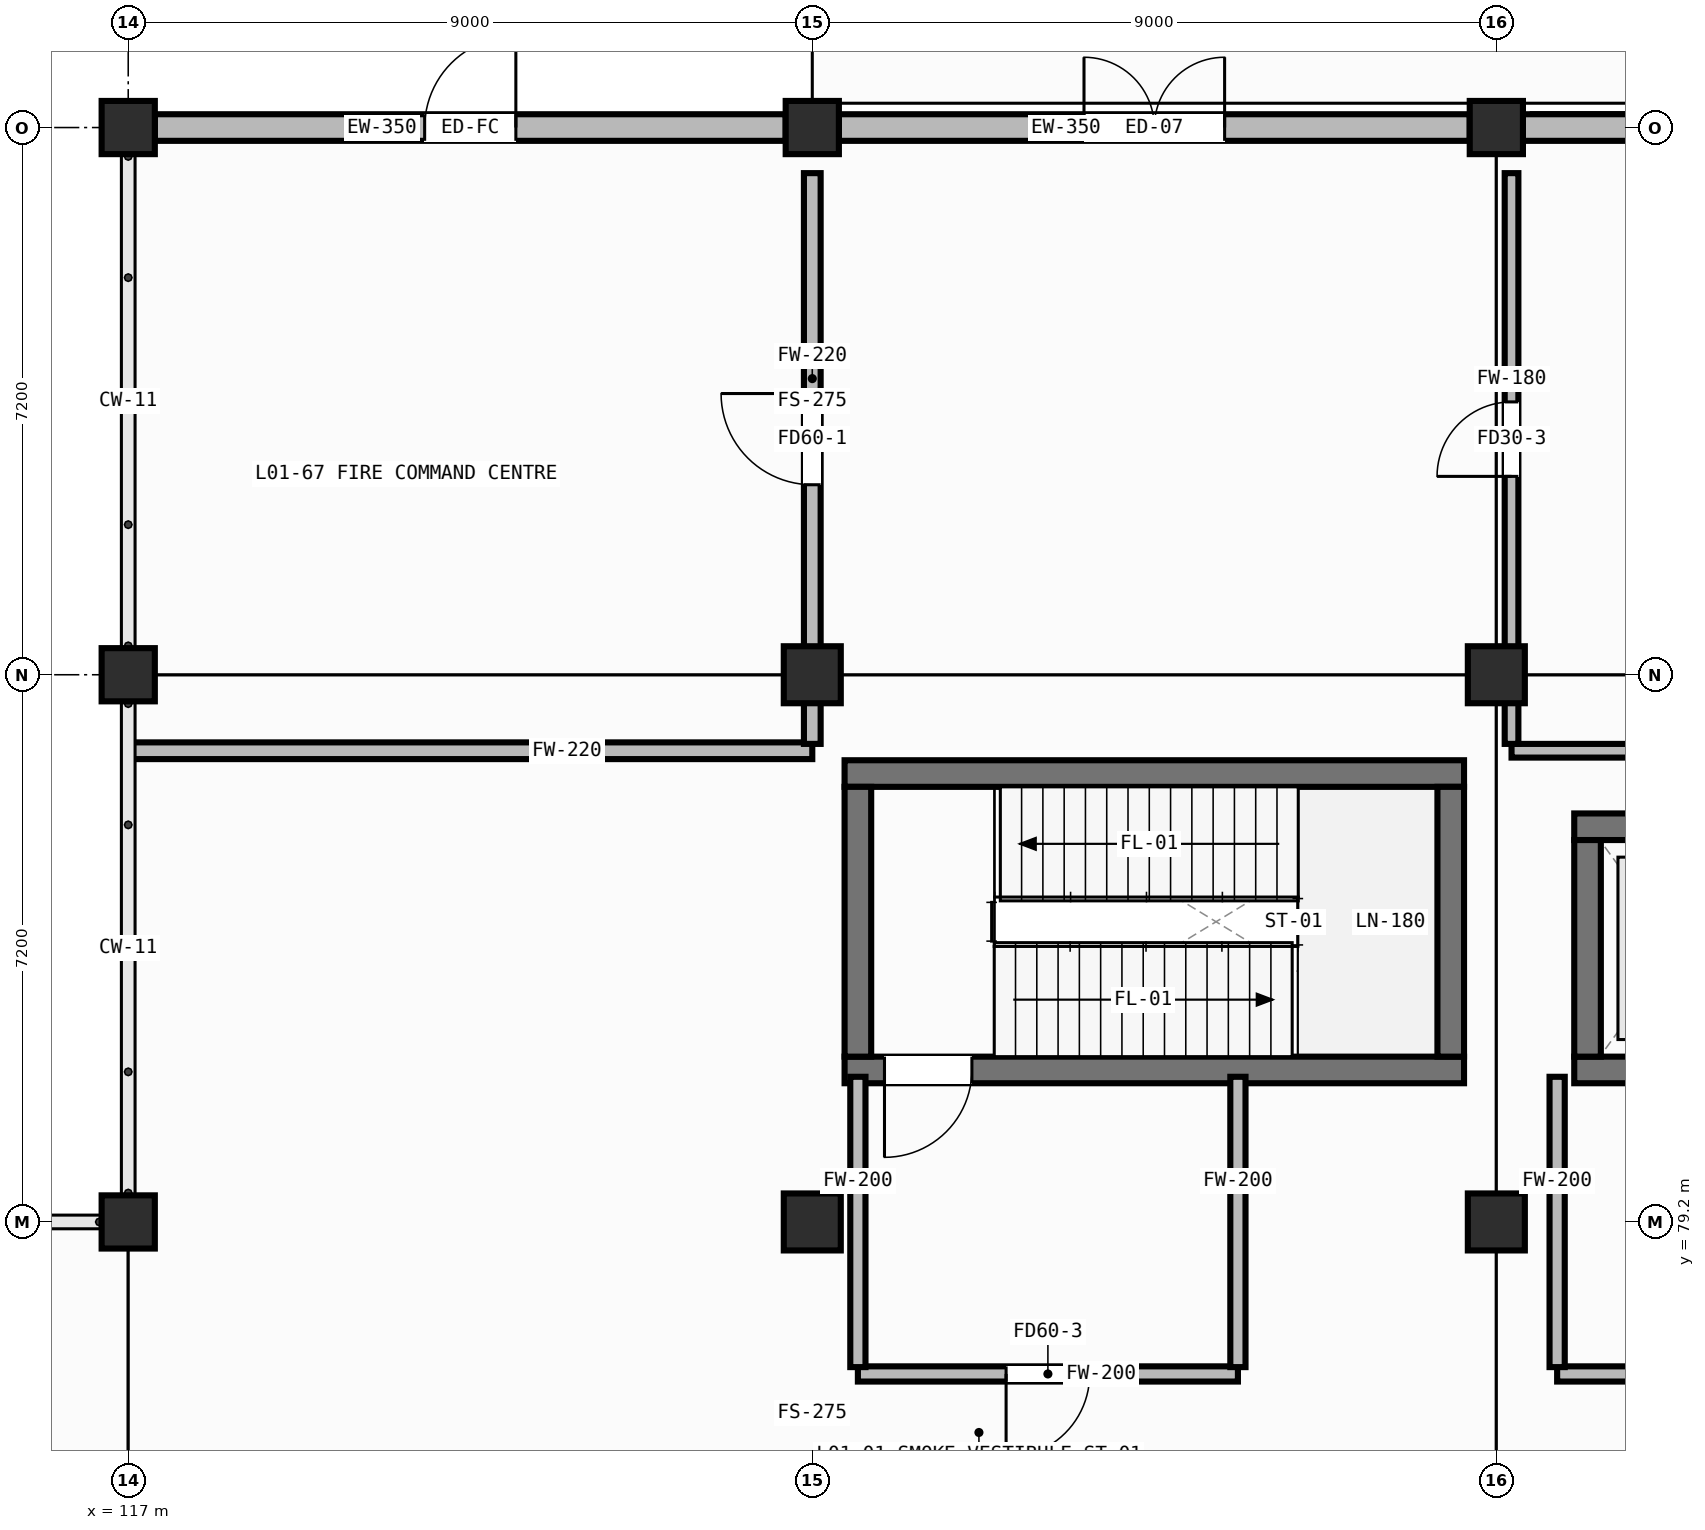
"""IFC4 building model, lengths in metres.
Left out: names, types, materials, properties, quantities, classifications, styles, units other than length and angle.
Written with IfcOpenShell. Run it as: python <this file> out.ifc"""

import sys

from ifc_helpers import new_model, si_unit, direction, frame, frame_2d, origin, origin_2d, place, context, subcontext, project, spatial, rectangle, hollow_rectangle, extrude, element, fill, save


model = new_model("IFC4")
c1 = context("Model", 3, precision=1e-05, world=origin(), true_north=direction((0.0, 1.0)))
c2 = subcontext(c1, "Body", "Model", "MODEL_VIEW")
j1 = project(units=[si_unit("LENGTHUNIT", "METRE"), si_unit("PLANEANGLEUNIT", "RADIAN")], contexts=[c1])
p1 = place(None, origin())
s1 = spatial("IfcSite", under=j1, at=p1, CompositionType="ELEMENT")
p2 = place(p1, origin())
s2 = spatial("IfcBuilding", under=s1, at=p2, CompositionType="ELEMENT")
p3 = place(p2, origin())
s3 = spatial("IfcBuildingStorey", under=s2, at=p3, CompositionType="ELEMENT", Elevation=0.0)
for number, where, z_axis, x_axis in (
    (1, (117.0, 79.2, 0.0), (0.0, 0.0, 1.0), (1.0, 0.0, 0.0)),
    (2, (117.0, 86.4, 0.0), (0.0, 0.0, 1.0), (1.0, 0.0, 0.0)),
    (3, (117.0, 93.6, 0.0), (0.0, 0.0, 1.0), (1.0, 0.0, 0.0)),
):
    element("IfcColumn", number, at=place(p3, frame(where, z_axis=z_axis, x_axis=x_axis)), inside=s3, PredefinedType="COLUMN", context=c2, shape_type="SweptSolid", body=[
        extrude(hollow_rectangle(XDim=0.7, YDim=0.7, WallThickness=0.028, at=origin_2d()), origin(), (0.0, 0.0, 1.0), 4.8),
    ])
for number, where, z_axis, x_axis in (
    (4, (126.0, 79.2, 0.0), (0.0, 0.0, 1.0), (1.0, 0.0, 0.0)),
    (5, (126.0, 86.4, 0.0), (0.0, 0.0, 1.0), (1.0, 0.0, 0.0)),
):
    element("IfcColumn", number, at=place(p3, frame(where, z_axis=z_axis, x_axis=x_axis)), inside=s3, PredefinedType="COLUMN", context=c2, shape_type="SweptSolid", body=[
        extrude(hollow_rectangle(XDim=0.75, YDim=0.75, WallThickness=0.032, at=origin_2d()), origin(), (0.0, 0.0, 1.0), 4.8),
    ])
p4 = place(p3, frame((126.0, 93.6, 0.0), z_axis=(0.0, 0.0, 1.0), x_axis=(1.0, 0.0, 0.0)))
e6 = element("IfcColumn", 6, at=p4, inside=s3, PredefinedType="COLUMN", context=c2, shape_type="SweptSolid", body=[
    extrude(hollow_rectangle(XDim=0.7, YDim=0.7, WallThickness=0.028, at=origin_2d()), origin(), (0.0, 0.0, 1.0), 4.8),
])
for number, where, z_axis, x_axis in (
    (7, (135.0, 79.2, 0.0), (0.0, 0.0, 1.0), (1.0, 0.0, 0.0)),
    (8, (135.0, 86.4, 0.0), (0.0, 0.0, 1.0), (1.0, 0.0, 0.0)),
):
    element("IfcColumn", number, at=place(p3, frame(where, z_axis=z_axis, x_axis=x_axis)), inside=s3, PredefinedType="COLUMN", context=c2, shape_type="SweptSolid", body=[
        extrude(hollow_rectangle(XDim=0.75, YDim=0.75, WallThickness=0.032, at=origin_2d()), origin(), (0.0, 0.0, 1.0), 4.8),
    ])
p5 = place(p3, frame((135.0, 93.6, 0.0), z_axis=(0.0, 0.0, 1.0), x_axis=(1.0, 0.0, 0.0)))
e9 = element("IfcColumn", 9, at=p5, inside=s3, PredefinedType="COLUMN", context=c2, shape_type="SweptSolid", body=[
    extrude(hollow_rectangle(XDim=0.7, YDim=0.7, WallThickness=0.028, at=origin_2d()), origin(), (0.0, 0.0, 1.0), 4.8),
])
p6 = place(p3, frame((125.65, 93.6, 0.0), z_axis=(0.0, 0.0, 1.0), x_axis=(-1.0, 0.0, 0.0)))
e10 = element("IfcWall", 10, at=p6, inside=s3, PredefinedType="STANDARD", context=c2, shape_type="SweptSolid", body=[
    extrude(rectangle(XDim=8.3, YDim=0.35, at=frame_2d((4.15, 0.0))), origin(), (0.0, 0.0, 1.0), 4.055),
])
p7 = place(p6, frame((3.55, 0.0, 0.0)))
e11 = element("IfcOpeningElement", 11, at=p7, cuts=e10, PredefinedType="OPENING", context=c2, shape_type="SweptSolid", body=[
    extrude(rectangle(XDim=1.2, YDim=2.2, at=frame_2d((0.6, 1.1))), frame((0.0, 0.187, 0.0), z_axis=(0.0, -1.0, 0.0), x_axis=(1.0, 0.0, 0.0)), (0.0, 0.0, 1.0), 0.374),
])
p8 = place(p3, frame((134.65, 93.6, 0.0), z_axis=(0.0, 0.0, 1.0), x_axis=(-1.0, 0.0, 0.0)))
e12 = element("IfcWall", 12, at=p8, inside=s3, PredefinedType="STANDARD", context=c2, shape_type="SweptSolid", body=[
    extrude(rectangle(XDim=8.3, YDim=0.35, at=frame_2d((4.15, 0.0))), origin(), (0.0, 0.0, 1.0), 4.055),
])
p9 = place(p8, frame((3.225, 0.0, 0.0)))
e13 = element("IfcOpeningElement", 13, at=p9, cuts=e12, PredefinedType="OPENING", context=c2, shape_type="SweptSolid", body=[
    extrude(rectangle(XDim=1.85, YDim=2.35, at=frame_2d((0.925, 1.175))), frame((0.0, 0.187, 0.0), z_axis=(0.0, -1.0, 0.0), x_axis=(1.0, 0.0, 0.0)), (0.0, 0.0, 1.0), 0.374),
])
p10 = place(p3, frame((143.65, 93.6, 0.0), z_axis=(0.0, 0.0, 1.0), x_axis=(-1.0, 0.0, 0.0)))
e14 = element("IfcWall", 14, at=p10, inside=s3, PredefinedType="STANDARD", context=c2, shape_type="SweptSolid", body=[
    extrude(rectangle(XDim=8.3, YDim=0.35, at=frame_2d((4.15, 0.0))), origin(), (0.0, 0.0, 1.0), 4.055),
])
p11 = place(p10, frame((2.85, 0.0, 0.85)))
e15 = element("IfcOpeningElement", 15, at=p11, cuts=e14, PredefinedType="OPENING", context=c2, shape_type="SweptSolid", body=[
    extrude(rectangle(XDim=2.6, YDim=1.6, at=frame_2d((1.3, 0.8))), frame((0.0, 0.187, 0.0), z_axis=(0.0, -1.0, 0.0), x_axis=(1.0, 0.0, 0.0)), (0.0, 0.0, 1.0), 0.374),
])
p12 = place(p3, frame((126.425, 81.2, 0.0), z_axis=(0.0, 0.0, 1.0), x_axis=(1.0, 0.0, 0.0)))
e16 = element("IfcWall", 16, at=p12, inside=s3, PredefinedType="SHEAR", context=c2, shape_type="SweptSolid", body=[
    extrude(rectangle(XDim=8.15, YDim=0.35, at=frame_2d((4.075, 0.0))), origin(), (0.0, 0.0, 1.0), 4.555),
])
p13 = place(p12, frame((0.525, 0.0, 0.0)))
e17 = element("IfcOpeningElement", 17, at=p13, cuts=e16, PredefinedType="OPENING", context=c2, shape_type="SweptSolid", body=[
    extrude(rectangle(XDim=1.15, YDim=2.1, at=frame_2d((0.575, 1.05))), frame((0.0, 0.187, 0.0), z_axis=(0.0, -1.0, 0.0), x_axis=(1.0, 0.0, 0.0)), (0.0, 0.0, 1.0), 0.374),
])
p14 = place(p3, frame((126.425, 85.1, 0.0), z_axis=(0.0, 0.0, 1.0), x_axis=(1.0, 0.0, 0.0)))
e18 = element("IfcWall", 18, at=p14, inside=s3, PredefinedType="SHEAR", context=c2, shape_type="SweptSolid", body=[
    extrude(rectangle(XDim=8.15, YDim=0.35, at=frame_2d((4.075, 0.0))), origin(), (0.0, 0.0, 1.0), 4.555),
])
for number, where, z_axis, x_axis in (
    (19, (126.6, 81.375, 0.0), (0.0, 0.0, 1.0), (0.0, 1.0, 0.0)),
    (20, (134.4, 81.375, 0.0), (0.0, 0.0, 1.0), (0.0, 1.0, 0.0)),
):
    element("IfcWall", number, at=place(p3, frame(where, z_axis=z_axis, x_axis=x_axis)), inside=s3, PredefinedType="SHEAR", context=c2, shape_type="SweptSolid", body=[
        extrude(rectangle(XDim=3.55, YDim=0.35, at=frame_2d((1.775, 0.0))), origin(), (0.0, 0.0, 1.0), 4.555),
    ])
p15 = place(p3, frame((136.025, 81.2, 0.0), z_axis=(0.0, 0.0, 1.0), x_axis=(1.0, 0.0, 0.0)))
e21 = element("IfcWall", 21, at=p15, inside=s3, PredefinedType="SHEAR", context=c2, shape_type="SweptSolid", body=[
    extrude(rectangle(XDim=2.75, YDim=0.35, at=frame_2d((1.375, 0.0))), origin(), (0.0, 0.0, 1.0), 4.555),
])
p16 = place(p15, frame((0.8, 0.0, 0.0)))
e22 = element("IfcOpeningElement", 22, at=p16, cuts=e21, PredefinedType="OPENING", context=c2, shape_type="SweptSolid", body=[
    extrude(rectangle(XDim=1.15, YDim=2.12, at=frame_2d((0.575, 1.06))), frame((0.0, 0.187, 0.0), z_axis=(0.0, -1.0, 0.0), x_axis=(1.0, 0.0, 0.0)), (0.0, 0.0, 1.0), 0.374),
])
p17 = place(p3, frame((136.025, 84.4, 0.0), z_axis=(0.0, 0.0, 1.0), x_axis=(1.0, 0.0, 0.0)))
e23 = element("IfcWall", 23, at=p17, inside=s3, PredefinedType="SHEAR", context=c2, shape_type="SweptSolid", body=[
    extrude(rectangle(XDim=2.75, YDim=0.35, at=frame_2d((1.375, 0.0))), origin(), (0.0, 0.0, 1.0), 4.555),
])
p18 = place(p3, frame((136.2, 81.375, 0.0), z_axis=(0.0, 0.0, 1.0), x_axis=(0.0, 1.0, 0.0)))
e24 = element("IfcWall", 24, at=p18, inside=s3, PredefinedType="SHEAR", context=c2, shape_type="SweptSolid", body=[
    extrude(rectangle(XDim=2.85, YDim=0.35, at=frame_2d((1.425, 0.0))), origin(), (0.0, 0.0, 1.0), 4.555),
])
p19 = place(p3, frame((126.6, 77.2, 0.0), z_axis=(0.0, 0.0, 1.0), x_axis=(1.0, 0.0, 0.0)))
e25 = element("IfcWall", 25, at=p19, inside=s3, PredefinedType="PARTITIONING", context=c2, shape_type="SweptSolid", body=[
    extrude(rectangle(XDim=5.0, YDim=0.2, at=frame_2d((2.5, 0.0))), origin(), (0.0, 0.0, 1.0), 4.555),
])
p20 = place(p19, frame((1.95, 0.0, 0.0)))
e26 = element("IfcOpeningElement", 26, at=p20, cuts=e25, PredefinedType="OPENING", context=c2, shape_type="SweptSolid", body=[
    extrude(rectangle(XDim=1.1, YDim=2.08, at=frame_2d((0.55, 1.04))), frame((0.0, 0.112, 0.0), z_axis=(0.0, -1.0, 0.0), x_axis=(1.0, 0.0, 0.0)), (0.0, 0.0, 1.0), 0.224),
])
for number, where, z_axis, x_axis in (
    (27, (126.6, 77.29, 0.0), (0.0, 0.0, 1.0), (0.0, 1.0, 0.0)),
    (28, (131.6, 77.29, 0.0), (0.0, 0.0, 1.0), (0.0, 1.0, 0.0)),
):
    element("IfcWall", number, at=place(p3, frame(where, z_axis=z_axis, x_axis=x_axis)), inside=s3, PredefinedType="PARTITIONING", context=c2, shape_type="SweptSolid", body=[
        extrude(rectangle(XDim=3.82, YDim=0.2, at=frame_2d((1.91, 0.0))), origin(), (0.0, 0.0, 1.0), 4.555),
    ])
p21 = place(p3, frame((135.8, 77.2, 0.0), z_axis=(0.0, 0.0, 1.0), x_axis=(1.0, 0.0, 0.0)))
e29 = element("IfcWall", 29, at=p21, inside=s3, PredefinedType="PARTITIONING", context=c2, shape_type="SweptSolid", body=[
    extrude(rectangle(XDim=7.8, YDim=0.2, at=frame_2d((3.9, 0.0))), origin(), (0.0, 0.0, 1.0), 4.555),
])
p22 = place(p21, frame((3.1, 0.0, 0.0)))
e30 = element("IfcOpeningElement", 30, at=p22, cuts=e29, PredefinedType="OPENING", context=c2, shape_type="SweptSolid", body=[
    extrude(rectangle(XDim=1.2, YDim=2.1, at=frame_2d((0.6, 1.05))), frame((0.0, 0.112, 0.0), z_axis=(0.0, -1.0, 0.0), x_axis=(1.0, 0.0, 0.0)), (0.0, 0.0, 1.0), 0.224),
])
p23 = place(p3, frame((135.8, 77.29, 0.0), z_axis=(0.0, 0.0, 1.0), x_axis=(0.0, 1.0, 0.0)))
e31 = element("IfcWall", 31, at=p23, inside=s3, PredefinedType="PARTITIONING", context=c2, shape_type="SweptSolid", body=[
    extrude(rectangle(XDim=3.82, YDim=0.2, at=frame_2d((1.91, 0.0))), origin(), (0.0, 0.0, 1.0), 4.555),
])
p24 = place(p3, frame((117.035, 85.4, 0.0), z_axis=(0.0, 0.0, 1.0), x_axis=(1.0, 0.0, 0.0)))
e32 = element("IfcWall", 32, at=p24, inside=s3, PredefinedType="PARTITIONING", context=c2, shape_type="SweptSolid", body=[
    extrude(rectangle(XDim=8.965, YDim=0.22, at=frame_2d((4.482, 0.0))), origin(), (0.0, 0.0, 1.0), 4.555),
])
p25 = place(p3, frame((126.0, 85.49, 0.0), z_axis=(0.0, 0.0, 1.0), x_axis=(0.0, 1.0, 0.0)))
e33 = element("IfcWall", 33, at=p25, inside=s3, PredefinedType="PARTITIONING", context=c2, shape_type="SweptSolid", body=[
    extrude(rectangle(XDim=7.51, YDim=0.22, at=frame_2d((3.755, 0.0))), origin(), (0.0, 0.0, 1.0), 3.835),
])
p26 = place(p25, frame((3.41, 0.0, 0.0)))
e34 = element("IfcOpeningElement", 34, at=p26, cuts=e33, PredefinedType="OPENING", context=c2, shape_type="SweptSolid", body=[
    extrude(rectangle(XDim=1.2, YDim=2.1, at=frame_2d((0.6, 1.05))), frame((0.0, 0.122, 0.0), z_axis=(0.0, -1.0, 0.0), x_axis=(1.0, 0.0, 0.0)), (0.0, 0.0, 1.0), 0.244),
])
p27 = place(p3, frame((135.2, 85.4, 0.0), z_axis=(0.0, 0.0, 1.0), x_axis=(1.0, 0.0, 0.0)))
e35 = element("IfcWall", 35, at=p27, inside=s3, PredefinedType="PARTITIONING", context=c2, shape_type="SweptSolid", body=[
    extrude(rectangle(XDim=18.0, YDim=0.18, at=frame_2d((9.0, 0.0))), origin(), (0.0, 0.0, 1.0), 4.555),
])
p28 = place(p3, frame((135.2, 85.49, 0.0), z_axis=(0.0, 0.0, 1.0), x_axis=(0.0, 1.0, 0.0)))
e36 = element("IfcWall", 36, at=p28, inside=s3, PredefinedType="PARTITIONING", context=c2, shape_type="SweptSolid", body=[
    extrude(rectangle(XDim=7.51, YDim=0.18, at=frame_2d((3.755, 0.0))), origin(), (0.0, 0.0, 1.0), 3.835),
])
p29 = place(p28, frame((3.52, 0.0, 0.0)))
e37 = element("IfcOpeningElement", 37, at=p29, cuts=e36, PredefinedType="OPENING", context=c2, shape_type="SweptSolid", body=[
    extrude(rectangle(XDim=0.98, YDim=2.02, at=frame_2d((0.49, 1.01))), frame((0.0, 0.102, 0.0), z_axis=(0.0, -1.0, 0.0), x_axis=(1.0, 0.0, 0.0)), (0.0, 0.0, 1.0), 0.204),
])
p30 = place(p7, frame((1.2, 0.0, 0.0), z_axis=(0.0, 0.0, 1.0), x_axis=(-1.0, 0.0, 0.0)))
e38 = element("IfcDoor", 38, at=p30, inside=s3, OperationType="SINGLE_SWING_RIGHT", PredefinedType="DOOR", context=c2, shape_type="SweptSolid", body=[
    extrude(rectangle(XDim=1.2, YDim=2.2, at=frame_2d((0.6, 1.1))), frame((0.0, 0.025, 0.0), z_axis=(0.0, -1.0, 0.0), x_axis=(1.0, 0.0, 0.0)), (0.0, 0.0, 1.0), 0.05),
])
fill(e11, e38)
p31 = place(p9, frame((1.85, 0.0, 0.0), z_axis=(0.0, 0.0, 1.0), x_axis=(-1.0, 0.0, 0.0)))
e39 = element("IfcDoor", 39, at=p31, inside=s3, OperationType="DOUBLE_DOOR_SINGLE_SWING", PredefinedType="DOOR", context=c2, shape_type="SweptSolid", body=[
    extrude(rectangle(XDim=1.85, YDim=2.35, at=frame_2d((0.925, 1.175))), frame((0.0, 0.025, 0.0), z_axis=(0.0, -1.0, 0.0), x_axis=(1.0, 0.0, 0.0)), (0.0, 0.0, 1.0), 0.05),
])
fill(e13, e39)
p32 = place(p13, frame((1.15, 0.0, 0.0), z_axis=(0.0, 0.0, 1.0), x_axis=(-1.0, 0.0, 0.0)))
e40 = element("IfcDoor", 40, at=p32, inside=s3, OperationType="SINGLE_SWING_RIGHT", PredefinedType="DOOR", context=c2, shape_type="SweptSolid", body=[
    extrude(rectangle(XDim=1.15, YDim=2.1, at=frame_2d((0.575, 1.05))), frame((0.0, 0.025, 0.0), z_axis=(0.0, -1.0, 0.0), x_axis=(1.0, 0.0, 0.0)), (0.0, 0.0, 1.0), 0.05),
])
fill(e17, e40)
p33 = place(p20, frame((1.1, 0.0, 0.0), z_axis=(0.0, 0.0, 1.0), x_axis=(-1.0, 0.0, 0.0)))
e41 = element("IfcDoor", 41, at=p33, inside=s3, OperationType="SINGLE_SWING_RIGHT", PredefinedType="DOOR", context=c2, shape_type="SweptSolid", body=[
    extrude(rectangle(XDim=1.1, YDim=2.08, at=frame_2d((0.55, 1.04))), frame((0.0, 0.025, 0.0), z_axis=(0.0, -1.0, 0.0), x_axis=(1.0, 0.0, 0.0)), (0.0, 0.0, 1.0), 0.05),
])
fill(e26, e41)
p34 = place(p26, origin())
e42 = element("IfcDoor", 42, at=p34, inside=s3, OperationType="SINGLE_SWING_RIGHT", PredefinedType="DOOR", context=c2, shape_type="SweptSolid", body=[
    extrude(rectangle(XDim=1.2, YDim=2.1, at=frame_2d((0.6, 1.05))), frame((0.0, 0.025, 0.0), z_axis=(0.0, -1.0, 0.0), x_axis=(1.0, 0.0, 0.0)), (0.0, 0.0, 1.0), 0.05),
])
fill(e34, e42)
p35 = place(p29, origin())
e43 = element("IfcDoor", 43, at=p35, inside=s3, OperationType="SINGLE_SWING_LEFT", PredefinedType="DOOR", context=c2, shape_type="SweptSolid", body=[
    extrude(rectangle(XDim=0.98, YDim=2.02, at=frame_2d((0.49, 1.01))), frame((0.0, 0.025, 0.0), z_axis=(0.0, -1.0, 0.0), x_axis=(1.0, 0.0, 0.0)), (0.0, 0.0, 1.0), 0.05),
])
fill(e37, e43)
save(model, sys.argv[1])
